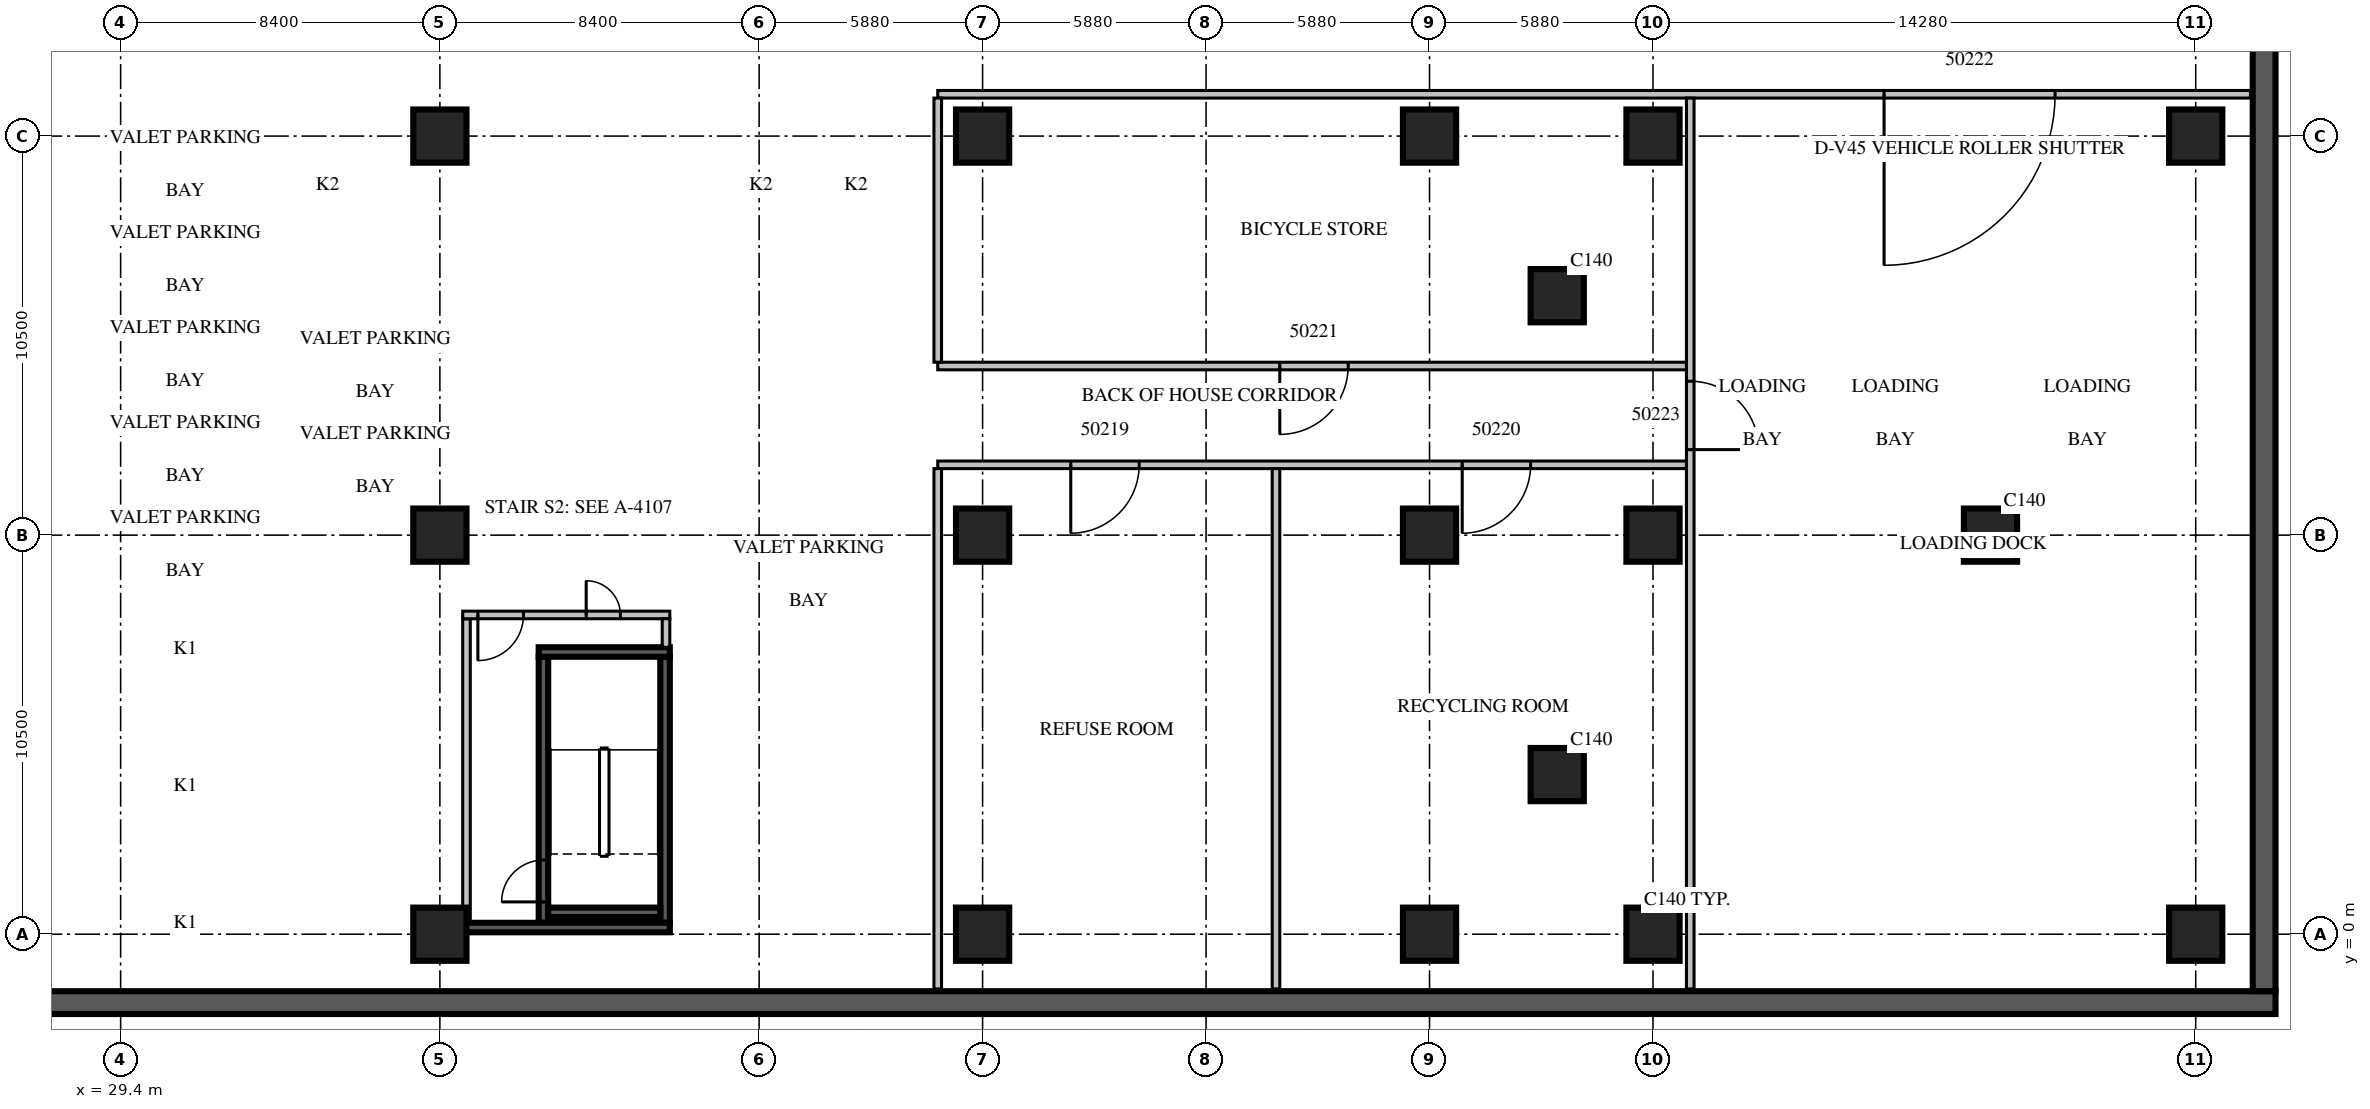
"""IFC4 building model, lengths in metres.
Left out: names, types, materials, properties, quantities, classifications, styles, units other than length and angle.
Written with IfcOpenShell. Run it as: python <this file> out.ifc"""

import sys

from ifc_helpers import new_model, si_unit, direction, frame, frame_2d, origin, origin_2d, place, context, subcontext, project, spatial, rectangle, extrude, source, transform, mapped, element, fill, save


model = new_model("IFC4")
c1 = context("Model", 3, precision=1e-05, world=origin(), true_north=direction((0.0, 1.0)))
c2 = subcontext(c1, "Body", "Model", "MODEL_VIEW")
j1 = project(units=[si_unit("LENGTHUNIT", "METRE"), si_unit("PLANEANGLEUNIT", "RADIAN")], contexts=[c1])
p1 = place(None, origin())
s1 = spatial("IfcSite", under=j1, at=p1, CompositionType="ELEMENT")
p2 = place(p1, origin())
s2 = spatial("IfcBuilding", under=s1, at=p2, CompositionType="ELEMENT")
p3 = place(p2, frame((0.0, 0.0, -4.5)))
s3 = spatial("IfcBuildingStorey", under=s2, at=p3, CompositionType="ELEMENT", Elevation=-4.5)
m1 = source(origin(), c2, "Body", "SweptSolid", [
    extrude(rectangle(XDim=87.6, YDim=0.6, at=frame_2d((43.8, 0.0))), origin(), (0.0, 0.0, 1.0), 4.5),
])
p4 = place(p3, frame((-1.5, -1.8, 0.0), z_axis=(0.0, 0.0, 1.0), x_axis=(1.0, 0.0, 0.0)))
e1 = element("IfcWall", 1, at=p4, inside=s3, PredefinedType="SOLIDWALL", context=c2, shape_type="MappedRepresentation", body=[
    mapped(m1, transform((0.0, 0.0, 0.0), scale=1.0)),
])
m2 = source(origin(), c2, "Body", "SweptSolid", [
    extrude(rectangle(XDim=55.68, YDim=0.6, at=frame_2d((27.84, 0.0))), origin(), (0.0, 0.0, 1.0), 4.5),
])
p5 = place(p3, frame((85.8, -1.5, 0.0), z_axis=(0.0, 0.0, 1.0), x_axis=(0.0, 1.0, 0.0)))
e2 = element("IfcWall", 2, at=p5, inside=s3, PredefinedType="SOLIDWALL", context=c2, shape_type="MappedRepresentation", body=[
    mapped(m2, transform((0.0, 0.0, 0.0), scale=1.0)),
])
m3 = source(origin(), c2, "Body", "SweptSolid", [
    extrude(rectangle(XDim=1.4, YDim=1.4, at=origin_2d()), origin(), (0.0, 0.0, 1.0), 4.5),
])
for number, where, z_axis, x_axis in (
    (3, (37.8, 0.0, 0.0), (0.0, 0.0, 1.0), (1.0, 0.0, 0.0)),
    (4, (37.8, 10.5, 0.0), (0.0, 0.0, 1.0), (1.0, 0.0, 0.0)),
    (5, (37.8, 21.0, 0.0), (0.0, 0.0, 1.0), (1.0, 0.0, 0.0)),
    (6, (52.08, 0.0, 0.0), (0.0, 0.0, 1.0), (1.0, 0.0, 0.0)),
    (7, (52.08, 10.5, 0.0), (0.0, 0.0, 1.0), (1.0, 0.0, 0.0)),
    (8, (52.08, 21.0, 0.0), (0.0, 0.0, 1.0), (1.0, 0.0, 0.0)),
    (9, (63.84, 0.0, 0.0), (0.0, 0.0, 1.0), (1.0, 0.0, 0.0)),
    (10, (63.84, 10.5, 0.0), (0.0, 0.0, 1.0), (1.0, 0.0, 0.0)),
    (11, (63.84, 21.0, 0.0), (0.0, 0.0, 1.0), (1.0, 0.0, 0.0)),
    (12, (67.2, 4.2, 0.0), (0.0, 0.0, 1.0), (1.0, 0.0, 0.0)),
    (13, (67.2, 16.8, 0.0), (0.0, 0.0, 1.0), (1.0, 0.0, 0.0)),
    (14, (69.72, 0.0, 0.0), (0.0, 0.0, 1.0), (1.0, 0.0, 0.0)),
    (15, (69.72, 10.5, 0.0), (0.0, 0.0, 1.0), (1.0, 0.0, 0.0)),
    (16, (69.72, 21.0, 0.0), (0.0, 0.0, 1.0), (1.0, 0.0, 0.0)),
    (17, (78.6, 10.5, 0.0), (0.0, 0.0, 1.0), (1.0, 0.0, 0.0)),
    (18, (84.0, 0.0, 0.0), (0.0, 0.0, 1.0), (1.0, 0.0, 0.0)),
    (19, (84.0, 21.0, 0.0), (0.0, 0.0, 1.0), (1.0, 0.0, 0.0)),
):
    element("IfcColumn", number, at=place(p3, frame(where, z_axis=z_axis, x_axis=x_axis)), inside=s3, PredefinedType="COLUMN", context=c2, shape_type="MappedRepresentation", body=[
        mapped(m3, transform((0.0, 0.0, 0.0), scale=1.0)),
    ])
m4 = source(origin(), c2, "Body", "SweptSolid", [
    extrude(rectangle(XDim=7.0, YDim=0.25, at=frame_2d((3.5, 0.0))), origin(), (0.0, 0.0, 1.0), 3.9),
])
p6 = place(p3, frame((40.525, 0.3, 0.0), z_axis=(0.0, 0.0, 1.0), x_axis=(0.0, 1.0, 0.0)))
e20 = element("IfcWall", 20, at=p6, inside=s3, PredefinedType="SOLIDWALL", context=c2, shape_type="MappedRepresentation", body=[
    mapped(m4, transform((0.0, 0.0, 0.0), scale=1.0)),
])
m5 = source(origin(), c2, "Body", "SweptSolid", [
    extrude(rectangle(XDim=1.1, YDim=2.1, at=frame_2d((0.55, 1.05))), frame((0.0, 0.135, 0.0), z_axis=(0.0, -1.0, 0.0), x_axis=(1.0, 0.0, 0.0)), (0.0, 0.0, 1.0), 0.27),
])
p7 = place(p6, frame((0.55, 0.0, 0.0)))
e21 = element("IfcOpeningElement", 21, at=p7, cuts=e20, PredefinedType="OPENING", context=c2, shape_type="MappedRepresentation", body=[
    mapped(m5, transform((0.0, 0.0, 0.0), scale=1.0)),
])
p8 = place(p3, frame((43.725, 0.3, 0.0), z_axis=(0.0, 0.0, 1.0), x_axis=(0.0, 1.0, 0.0)))
e22 = element("IfcWall", 22, at=p8, inside=s3, PredefinedType="SOLIDWALL", context=c2, shape_type="MappedRepresentation", body=[
    mapped(m4, transform((0.0, 0.0, 0.0), scale=1.0)),
])
m6 = source(origin(), c2, "Body", "SweptSolid", [
    extrude(rectangle(XDim=3.45, YDim=0.25, at=frame_2d((1.725, 0.0))), origin(), (0.0, 0.0, 1.0), 3.9),
])
p9 = place(p3, frame((40.4, 7.425, 0.0), z_axis=(0.0, 0.0, 1.0), x_axis=(1.0, 0.0, 0.0)))
e23 = element("IfcWall", 23, at=p9, inside=s3, PredefinedType="SOLIDWALL", context=c2, shape_type="MappedRepresentation", body=[
    mapped(m6, transform((0.0, 0.0, 0.0), scale=1.0)),
])
m7 = source(origin(), c2, "Body", "SweptSolid", [
    extrude(rectangle(XDim=2.95, YDim=0.25, at=frame_2d((1.475, 0.0))), origin(), (0.0, 0.0, 1.0), 3.9),
])
p10 = place(p3, frame((40.65, 0.575, 0.0), z_axis=(0.0, 0.0, 1.0), x_axis=(1.0, 0.0, 0.0)))
e24 = element("IfcWall", 24, at=p10, inside=s3, PredefinedType="SOLIDWALL", context=c2, shape_type="MappedRepresentation", body=[
    mapped(m7, transform((0.0, 0.0, 0.0), scale=1.0)),
])
m8 = source(origin(), c2, "Body", "SweptSolid", [
    extrude(rectangle(XDim=8.0, YDim=0.2, at=frame_2d((4.0, 0.0))), origin(), (0.0, 0.0, 1.0), 3.9),
])
p11 = place(p3, frame((38.5, 0.3, 0.0), z_axis=(0.0, 0.0, 1.0), x_axis=(0.0, 1.0, 0.0)))
e25 = element("IfcWall", 25, at=p11, inside=s3, PredefinedType="PARTITIONING", context=c2, shape_type="MappedRepresentation", body=[
    mapped(m8, transform((0.0, 0.0, 0.0), scale=1.0)),
])
m9 = source(origin(), c2, "Body", "SweptSolid", [
    extrude(rectangle(XDim=5.45, YDim=0.2, at=frame_2d((2.725, 0.0))), origin(), (0.0, 0.0, 1.0), 3.9),
])
p12 = place(p3, frame((38.4, 8.4, 0.0), z_axis=(0.0, 0.0, 1.0), x_axis=(1.0, 0.0, 0.0)))
e26 = element("IfcWall", 26, at=p12, inside=s3, PredefinedType="PARTITIONING", context=c2, shape_type="MappedRepresentation", body=[
    mapped(m9, transform((0.0, 0.0, 0.0), scale=1.0)),
])
m10 = source(origin(), c2, "Body", "SweptSolid", [
    extrude(rectangle(XDim=1.2, YDim=2.1, at=frame_2d((0.6, 1.05))), frame((0.0, 0.11, 0.0), z_axis=(0.0, -1.0, 0.0), x_axis=(1.0, 0.0, 0.0)), (0.0, 0.0, 1.0), 0.22),
])
p13 = place(p12, frame((0.4, 0.0, 0.0)))
e27 = element("IfcOpeningElement", 27, at=p13, cuts=e26, PredefinedType="OPENING", context=c2, shape_type="MappedRepresentation", body=[
    mapped(m10, transform((0.0, 0.0, 0.0), scale=1.0)),
])
m11 = source(origin(), c2, "Body", "SweptSolid", [
    extrude(rectangle(XDim=0.9, YDim=2.1, at=frame_2d((0.45, 1.05))), frame((0.0, 0.11, 0.0), z_axis=(0.0, -1.0, 0.0), x_axis=(1.0, 0.0, 0.0)), (0.0, 0.0, 1.0), 0.22),
])
p14 = place(p12, frame((3.25, 0.0, 0.0)))
e28 = element("IfcOpeningElement", 28, at=p14, cuts=e26, PredefinedType="OPENING", context=c2, shape_type="MappedRepresentation", body=[
    mapped(m11, transform((0.0, 0.0, 0.0), scale=1.0)),
])
m12 = source(origin(), c2, "Body", "SweptSolid", [
    extrude(rectangle(XDim=0.75, YDim=0.2, at=frame_2d((0.375, 0.0))), origin(), (0.0, 0.0, 1.0), 3.9),
])
p15 = place(p3, frame((43.75, 7.55, 0.0), z_axis=(0.0, 0.0, 1.0), x_axis=(0.0, 1.0, 0.0)))
e29 = element("IfcWall", 29, at=p15, inside=s3, PredefinedType="PARTITIONING", context=c2, shape_type="MappedRepresentation", body=[
    mapped(m12, transform((0.0, 0.0, 0.0), scale=1.0)),
])
m13 = source(origin(), c2, "Body", "SweptSolid", [
    extrude(rectangle(XDim=5.45, YDim=0.25, at=frame_2d((2.725, 0.0))), origin(), (0.0, 0.0, 1.0), 3.9),
])
p16 = place(p3, frame((38.4, 0.175, 0.0), z_axis=(0.0, 0.0, 1.0), x_axis=(1.0, 0.0, 0.0)))
e30 = element("IfcWall", 30, at=p16, inside=s3, PredefinedType="SOLIDWALL", context=c2, shape_type="MappedRepresentation", body=[
    mapped(m13, transform((0.0, 0.0, 0.0), scale=1.0)),
])
p17 = place(p3, frame((50.9, 12.35, 0.0), z_axis=(0.0, 0.0, 1.0), x_axis=(1.0, 0.0, 0.0)))
e31 = element("IfcWall", 31, at=p17, inside=s3, PredefinedType="PARTITIONING", context=c2, shape_type="SweptSolid", body=[
    extrude(rectangle(XDim=19.8, YDim=0.2, at=frame_2d((9.9, 0.0))), origin(), (0.0, 0.0, 1.0), 3.9),
])
m14 = source(origin(), c2, "Body", "SweptSolid", [
    extrude(rectangle(XDim=1.8, YDim=2.1, at=frame_2d((0.9, 1.05))), frame((0.0, 0.11, 0.0), z_axis=(0.0, -1.0, 0.0), x_axis=(1.0, 0.0, 0.0)), (0.0, 0.0, 1.0), 0.22),
])
p18 = place(p17, frame((3.5, 0.0, 0.0)))
e32 = element("IfcOpeningElement", 32, at=p18, cuts=e31, PredefinedType="OPENING", context=c2, shape_type="MappedRepresentation", body=[
    mapped(m14, transform((0.0, 0.0, 0.0), scale=1.0)),
])
p19 = place(p17, frame((13.8, 0.0, 0.0)))
e33 = element("IfcOpeningElement", 33, at=p19, cuts=e31, PredefinedType="OPENING", context=c2, shape_type="MappedRepresentation", body=[
    mapped(m14, transform((0.0, 0.0, 0.0), scale=1.0)),
])
m15 = source(origin(), c2, "Body", "SweptSolid", [
    extrude(rectangle(XDim=19.8, YDim=0.2, at=frame_2d((9.9, 0.0))), origin(), (0.0, 0.0, 1.0), 3.9),
])
p20 = place(p3, frame((50.9, 14.95, 0.0), z_axis=(0.0, 0.0, 1.0), x_axis=(1.0, 0.0, 0.0)))
e34 = element("IfcWall", 34, at=p20, inside=s3, PredefinedType="PARTITIONING", context=c2, shape_type="MappedRepresentation", body=[
    mapped(m15, transform((0.0, 0.0, 0.0), scale=1.0)),
])
p21 = place(p20, frame((9.0, 0.0, 0.0)))
e35 = element("IfcOpeningElement", 35, at=p21, cuts=e34, PredefinedType="OPENING", context=c2, shape_type="MappedRepresentation", body=[
    mapped(m14, transform((0.0, 0.0, 0.0), scale=1.0)),
])
m16 = source(origin(), c2, "Body", "SweptSolid", [
    extrude(rectangle(XDim=34.54, YDim=0.2, at=frame_2d((17.27, 0.0))), origin(), (0.0, 0.0, 1.0), 3.9),
])
p22 = place(p3, frame((50.9, 22.1, 0.0), z_axis=(0.0, 0.0, 1.0), x_axis=(1.0, 0.0, 0.0)))
e36 = element("IfcWall", 36, at=p22, inside=s3, PredefinedType="PARTITIONING", context=c2, shape_type="MappedRepresentation", body=[
    mapped(m16, transform((0.0, 0.0, 0.0), scale=1.0)),
])
p23 = place(p22, frame((24.9, 0.0, 0.0)))
e37 = element("IfcOpeningElement", 37, at=p23, cuts=e36, PredefinedType="OPENING", context=c2, shape_type="SweptSolid", body=[
    extrude(rectangle(XDim=4.5, YDim=3.5, at=frame_2d((2.25, 1.75))), frame((0.0, 0.11, 0.0), z_axis=(0.0, -1.0, 0.0), x_axis=(1.0, 0.0, 0.0)), (0.0, 0.0, 1.0), 0.22),
])
m17 = source(origin(), c2, "Body", "SweptSolid", [
    extrude(rectangle(XDim=13.69, YDim=0.2, at=frame_2d((6.845, 0.0))), origin(), (0.0, 0.0, 1.0), 3.9),
])
p24 = place(p3, frame((50.9, -1.44, 0.0), z_axis=(0.0, 0.0, 1.0), x_axis=(0.0, 1.0, 0.0)))
e38 = element("IfcWall", 38, at=p24, inside=s3, PredefinedType="PARTITIONING", context=c2, shape_type="MappedRepresentation", body=[
    mapped(m17, transform((0.0, 0.0, 0.0), scale=1.0)),
])
m18 = source(origin(), c2, "Body", "SweptSolid", [
    extrude(rectangle(XDim=6.95, YDim=0.2, at=frame_2d((3.475, 0.0))), origin(), (0.0, 0.0, 1.0), 3.9),
])
p25 = place(p3, frame((50.9, 15.05, 0.0), z_axis=(0.0, 0.0, 1.0), x_axis=(0.0, 1.0, 0.0)))
e39 = element("IfcWall", 39, at=p25, inside=s3, PredefinedType="PARTITIONING", context=c2, shape_type="MappedRepresentation", body=[
    mapped(m18, transform((0.0, 0.0, 0.0), scale=1.0)),
])
p26 = place(p3, frame((59.8, -1.44, 0.0), z_axis=(0.0, 0.0, 1.0), x_axis=(0.0, 1.0, 0.0)))
e40 = element("IfcWall", 40, at=p26, inside=s3, PredefinedType="PARTITIONING", context=c2, shape_type="MappedRepresentation", body=[
    mapped(m17, transform((0.0, 0.0, 0.0), scale=1.0)),
])
p27 = place(p3, frame((70.7, -1.44, 0.0), z_axis=(0.0, 0.0, 1.0), x_axis=(0.0, 1.0, 0.0)))
e41 = element("IfcWall", 41, at=p27, inside=s3, PredefinedType="PARTITIONING", context=c2, shape_type="SweptSolid", body=[
    extrude(rectangle(XDim=23.44, YDim=0.2, at=frame_2d((11.72, 0.0))), origin(), (0.0, 0.0, 1.0), 3.9),
])
p28 = place(p27, frame((14.19, 0.0, 0.0)))
e42 = element("IfcOpeningElement", 42, at=p28, cuts=e41, PredefinedType="OPENING", context=c2, shape_type="MappedRepresentation", body=[
    mapped(m14, transform((0.0, 0.0, 0.0), scale=1.0)),
])
m19 = source(origin(), c2, "Body", "SweptSolid", [
    extrude(rectangle(XDim=1.1, YDim=2.1, at=frame_2d((0.55, 1.05))), frame((0.0, 0.025, 0.0), z_axis=(0.0, -1.0, 0.0), x_axis=(1.0, 0.0, 0.0)), (0.0, 0.0, 1.0), 0.05),
])
p29 = place(p7, origin())
e43 = element("IfcDoor", 43, at=p29, inside=s3, OperationType="SINGLE_SWING_LEFT", PredefinedType="DOOR", context=c2, shape_type="MappedRepresentation", body=[
    mapped(m19, transform((0.0, 0.0, 0.0), scale=1.0)),
])
fill(e21, e43)
m20 = source(origin(), c2, "Body", "SweptSolid", [
    extrude(rectangle(XDim=1.2, YDim=2.1, at=frame_2d((0.6, 1.05))), frame((0.0, 0.025, 0.0), z_axis=(0.0, -1.0, 0.0), x_axis=(1.0, 0.0, 0.0)), (0.0, 0.0, 1.0), 0.05),
])
p30 = place(p13, origin())
e44 = element("IfcDoor", 44, at=p30, inside=s3, OperationType="SINGLE_SWING_RIGHT", PredefinedType="DOOR", context=c2, shape_type="MappedRepresentation", body=[
    mapped(m20, transform((0.0, 0.0, 0.0), scale=1.0)),
])
fill(e27, e44)
m21 = source(origin(), c2, "Body", "SweptSolid", [
    extrude(rectangle(XDim=0.9, YDim=2.1, at=frame_2d((0.45, 1.05))), frame((0.0, 0.025, 0.0), z_axis=(0.0, -1.0, 0.0), x_axis=(1.0, 0.0, 0.0)), (0.0, 0.0, 1.0), 0.05),
])
p31 = place(p14, origin())
e45 = element("IfcDoor", 45, at=p31, inside=s3, OperationType="SINGLE_SWING_LEFT", PredefinedType="DOOR", context=c2, shape_type="MappedRepresentation", body=[
    mapped(m21, transform((0.0, 0.0, 0.0), scale=1.0)),
])
fill(e28, e45)
m22 = source(origin(), c2, "Body", "SweptSolid", [
    extrude(rectangle(XDim=1.8, YDim=2.1, at=frame_2d((0.9, 1.05))), frame((0.0, 0.025, 0.0), z_axis=(0.0, -1.0, 0.0), x_axis=(1.0, 0.0, 0.0)), (0.0, 0.0, 1.0), 0.05),
])
p32 = place(p18, origin())
e46 = element("IfcDoor", 46, at=p32, inside=s3, OperationType="DOUBLE_DOOR_SINGLE_SWING", PredefinedType="DOOR", context=c2, shape_type="MappedRepresentation", body=[
    mapped(m22, transform((0.0, 0.0, 0.0), scale=1.0)),
])
fill(e32, e46)
p33 = place(p19, origin())
e47 = element("IfcDoor", 47, at=p33, inside=s3, OperationType="DOUBLE_DOOR_SINGLE_SWING", PredefinedType="DOOR", context=c2, shape_type="MappedRepresentation", body=[
    mapped(m22, transform((0.0, 0.0, 0.0), scale=1.0)),
])
fill(e33, e47)
p34 = place(p21, origin())
e48 = element("IfcDoor", 48, at=p34, inside=s3, OperationType="DOUBLE_DOOR_SINGLE_SWING", PredefinedType="DOOR", context=c2, shape_type="MappedRepresentation", body=[
    mapped(m22, transform((0.0, 0.0, 0.0), scale=1.0)),
])
fill(e35, e48)
p35 = place(p23, origin())
e49 = element("IfcDoor", 49, at=p35, inside=s3, OperationType="ROLLINGUP", PredefinedType="DOOR", context=c2, shape_type="SweptSolid", body=[
    extrude(rectangle(XDim=4.5, YDim=3.5, at=frame_2d((2.25, 1.75))), frame((0.0, 0.025, 0.0), z_axis=(0.0, -1.0, 0.0), x_axis=(1.0, 0.0, 0.0)), (0.0, 0.0, 1.0), 0.05),
])
fill(e37, e49)
p36 = place(p28, origin())
e50 = element("IfcDoor", 50, at=p36, inside=s3, OperationType="DOUBLE_DOOR_SINGLE_SWING", PredefinedType="DOOR", context=c2, shape_type="MappedRepresentation", body=[
    mapped(m22, transform((0.0, 0.0, 0.0), scale=1.0)),
])
fill(e42, e50)
save(model, sys.argv[1])
